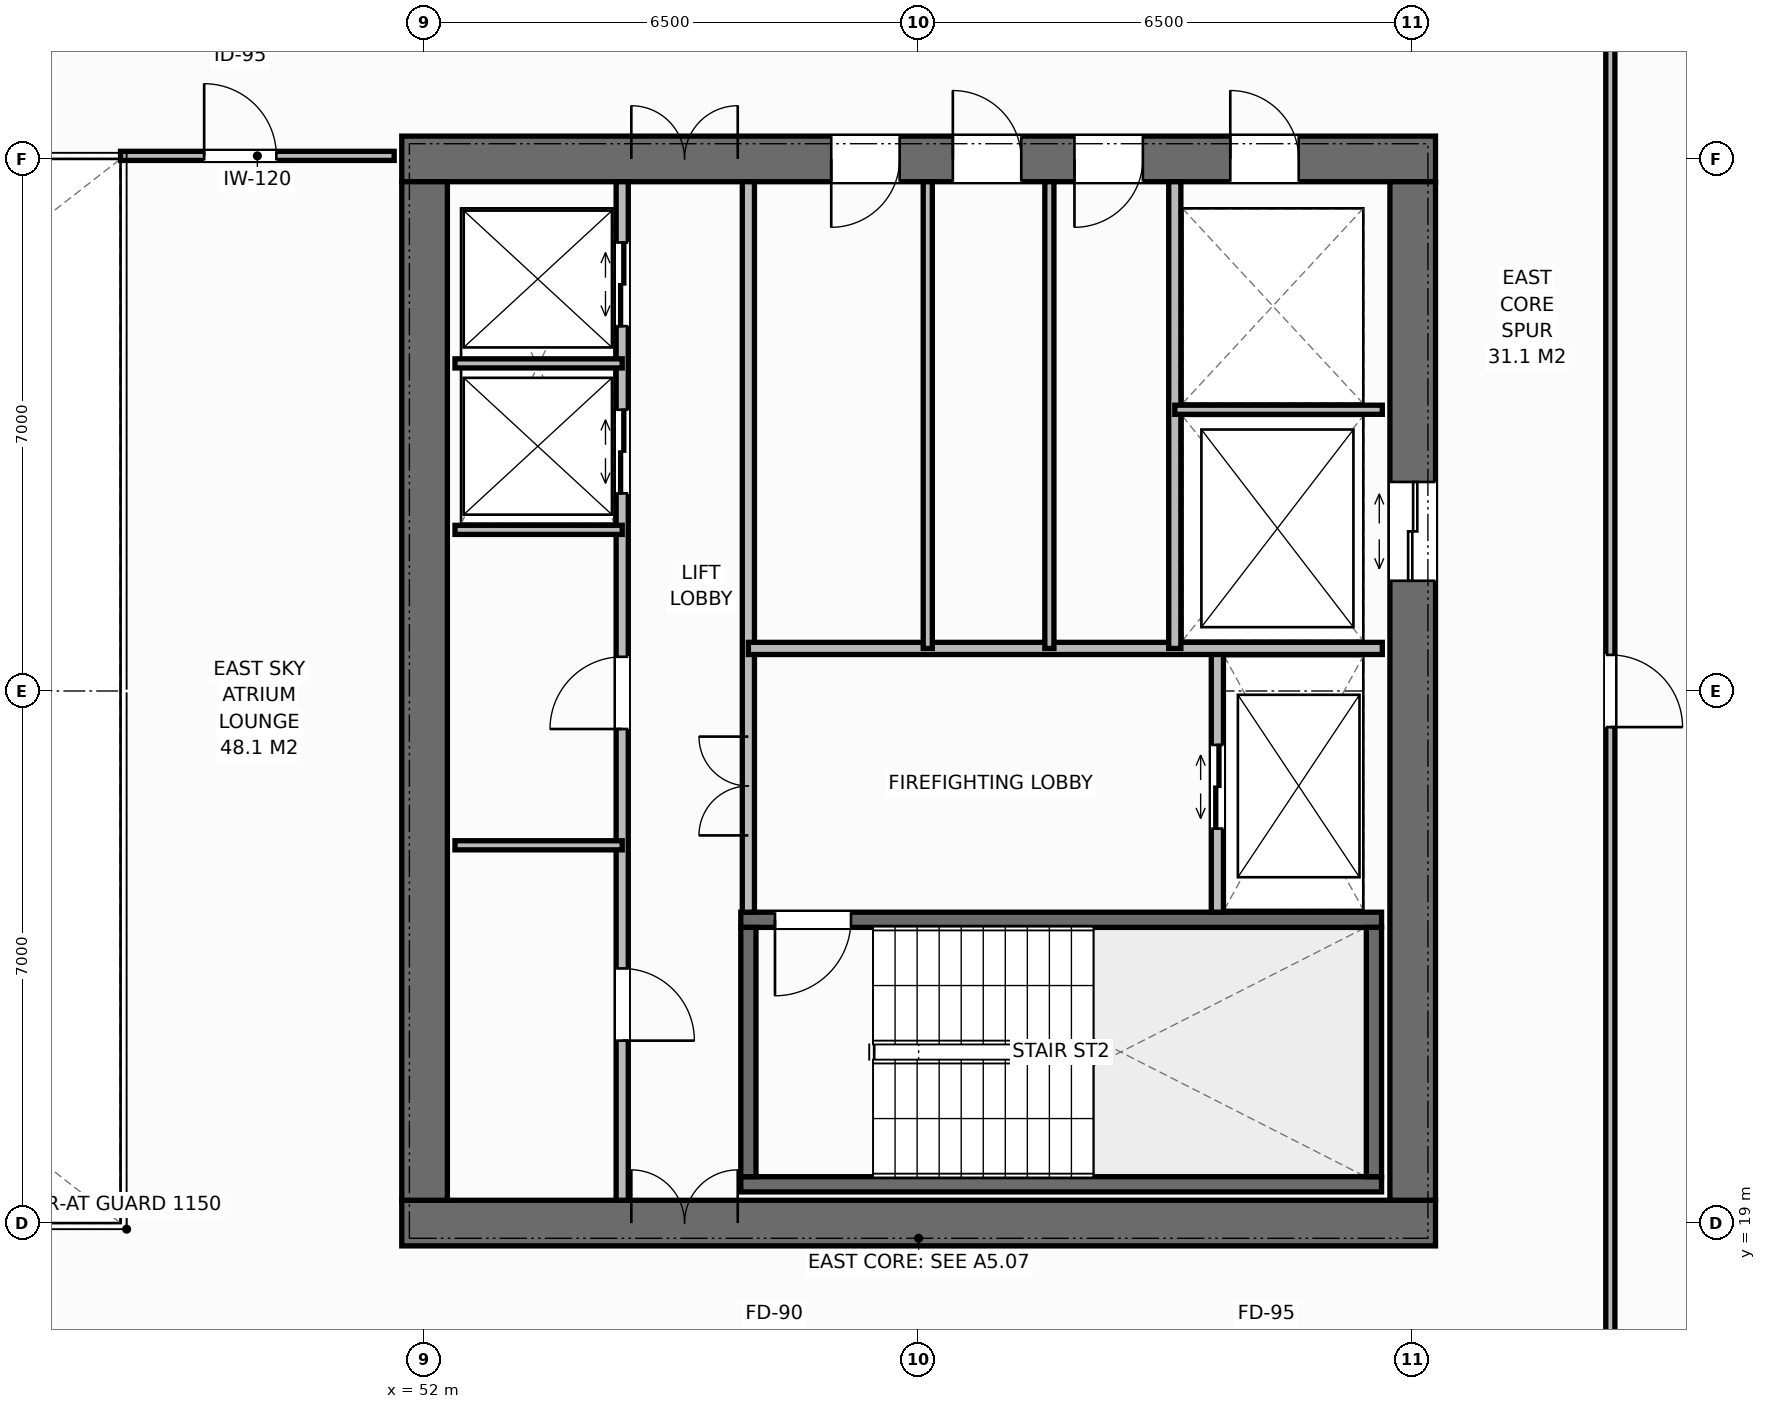
"""IFC4 building model, lengths in metres.
Left out: names, types, materials, properties, quantities, classifications, styles, units other than length and angle.
Written with IfcOpenShell. Run it as: python <this file> out.ifc"""

import sys

from ifc_helpers import new_model, si_unit, direction, frame, frame_2d, origin, place, context, subcontext, project, spatial, rectangle, extrude, element, fill, save


model = new_model("IFC4")
c1 = context("Model", 3, precision=1e-05, world=origin(), true_north=direction((0.0, 1.0)))
c2 = subcontext(c1, "Body", "Model", "MODEL_VIEW")
j1 = project(units=[si_unit("LENGTHUNIT", "METRE"), si_unit("PLANEANGLEUNIT", "RADIAN")], contexts=[c1])
p1 = place(None, origin())
s1 = spatial("IfcSite", under=j1, at=p1, CompositionType="ELEMENT")
p2 = place(p1, origin())
s2 = spatial("IfcBuilding", under=s1, at=p2, CompositionType="ELEMENT")
p3 = place(p2, frame((0.0, 0.0, 182.2)))
s3 = spatial("IfcBuildingStorey", under=s2, at=p3, CompositionType="ELEMENT", Elevation=182.2)
p4 = place(p3, frame((51.7, 19.0, 0.0), z_axis=(0.0, 0.0, 1.0), x_axis=(1.0, 0.0, 0.0)))
e1 = element("IfcWall", 1, at=p4, inside=s3, PredefinedType="SHEAR", context=c2, shape_type="SweptSolid", body=[
    extrude(rectangle(XDim=13.6, YDim=0.6, at=frame_2d((6.8, 0.0))), origin(), (0.0, 0.0, 1.0), 3.8),
])
p5 = place(p4, frame((3.02, 0.0, 0.0)))
e2 = element("IfcOpeningElement", 2, at=p5, cuts=e1, PredefinedType="OPENING", context=c2, shape_type="SweptSolid", body=[
    extrude(rectangle(XDim=1.4, YDim=2.2, at=frame_2d((0.7, 1.1))), frame((0.0, 0.31, 0.0), z_axis=(0.0, -1.0, 0.0), x_axis=(1.0, 0.0, 0.0)), (0.0, 0.0, 1.0), 0.62),
])
p6 = place(p3, frame((51.7, 33.0, 0.0), z_axis=(0.0, 0.0, 1.0), x_axis=(1.0, 0.0, 0.0)))
e3 = element("IfcWall", 3, at=p6, inside=s3, PredefinedType="SHEAR", context=c2, shape_type="SweptSolid", body=[
    extrude(rectangle(XDim=13.6, YDim=0.6, at=frame_2d((6.8, 0.0))), origin(), (0.0, 0.0, 1.0), 3.8),
])
p7 = place(p6, frame((3.02, 0.0, 0.0)))
e4 = element("IfcOpeningElement", 4, at=p7, cuts=e3, PredefinedType="OPENING", context=c2, shape_type="SweptSolid", body=[
    extrude(rectangle(XDim=1.4, YDim=2.2, at=frame_2d((0.7, 1.1))), frame((0.0, 0.31, 0.0), z_axis=(0.0, -1.0, 0.0), x_axis=(1.0, 0.0, 0.0)), (0.0, 0.0, 1.0), 0.62),
])
p8 = place(p6, frame((10.9, 0.0, 0.0)))
e5 = element("IfcOpeningElement", 5, at=p8, cuts=e3, PredefinedType="OPENING", context=c2, shape_type="SweptSolid", body=[
    extrude(rectangle(XDim=0.9, YDim=2.15, at=frame_2d((0.45, 1.075))), frame((0.0, 0.31, 0.0), z_axis=(0.0, -1.0, 0.0), x_axis=(1.0, 0.0, 0.0)), (0.0, 0.0, 1.0), 0.62),
])
p9 = place(p6, frame((5.65, 0.0, 0.0)))
e6 = element("IfcOpeningElement", 6, at=p9, cuts=e3, PredefinedType="OPENING", context=c2, shape_type="SweptSolid", body=[
    extrude(rectangle(XDim=0.9, YDim=2.15, at=frame_2d((0.45, 1.075))), frame((0.0, 0.31, 0.0), z_axis=(0.0, -1.0, 0.0), x_axis=(1.0, 0.0, 0.0)), (0.0, 0.0, 1.0), 0.62),
])
p10 = place(p6, frame((7.25, 0.0, 0.0)))
e7 = element("IfcOpeningElement", 7, at=p10, cuts=e3, PredefinedType="OPENING", context=c2, shape_type="SweptSolid", body=[
    extrude(rectangle(XDim=0.9, YDim=2.15, at=frame_2d((0.45, 1.075))), frame((0.0, 0.31, 0.0), z_axis=(0.0, -1.0, 0.0), x_axis=(1.0, 0.0, 0.0)), (0.0, 0.0, 1.0), 0.62),
])
p11 = place(p6, frame((8.85, 0.0, 0.0)))
e8 = element("IfcOpeningElement", 8, at=p11, cuts=e3, PredefinedType="OPENING", context=c2, shape_type="SweptSolid", body=[
    extrude(rectangle(XDim=0.9, YDim=2.15, at=frame_2d((0.45, 1.075))), frame((0.0, 0.31, 0.0), z_axis=(0.0, -1.0, 0.0), x_axis=(1.0, 0.0, 0.0)), (0.0, 0.0, 1.0), 0.62),
])
p12 = place(p3, frame((52.0, 19.3, 0.0), z_axis=(0.0, 0.0, 1.0), x_axis=(0.0, 1.0, 0.0)))
e9 = element("IfcWall", 9, at=p12, inside=s3, PredefinedType="SHEAR", context=c2, shape_type="SweptSolid", body=[
    extrude(rectangle(XDim=13.4, YDim=0.6, at=frame_2d((6.7, 0.0))), origin(), (0.0, 0.0, 1.0), 3.8),
])
p13 = place(p3, frame((65.0, 19.3, 0.0), z_axis=(0.0, 0.0, 1.0), x_axis=(0.0, 1.0, 0.0)))
e10 = element("IfcWall", 10, at=p13, inside=s3, PredefinedType="SHEAR", context=c2, shape_type="SweptSolid", body=[
    extrude(rectangle(XDim=13.4, YDim=0.6, at=frame_2d((6.7, 0.0))), origin(), (0.0, 0.0, 1.0), 3.8),
])
p14 = place(p13, frame((8.15, 0.0, 0.0)))
e11 = element("IfcOpeningElement", 11, at=p14, cuts=e10, PredefinedType="OPENING", context=c2, shape_type="SweptSolid", body=[
    extrude(rectangle(XDim=1.3, YDim=2.2, at=frame_2d((0.65, 1.1))), frame((0.0, 0.31, 0.0), z_axis=(0.0, -1.0, 0.0), x_axis=(1.0, 0.0, 0.0)), (0.0, 0.0, 1.0), 0.62),
])
p15 = place(p3, frame((56.16, 19.51, 0.0), z_axis=(0.0, 0.0, 1.0), x_axis=(1.0, 0.0, 0.0)))
e12 = element("IfcWall", 12, at=p15, inside=s3, PredefinedType="SHEAR", context=c2, shape_type="SweptSolid", body=[
    extrude(rectangle(XDim=8.43, YDim=0.2, at=frame_2d((4.215, 0.0))), origin(), (0.0, 0.0, 1.0), 3.8),
])
p16 = place(p3, frame((56.16, 22.99, 0.0), z_axis=(0.0, 0.0, 1.0), x_axis=(1.0, 0.0, 0.0)))
e13 = element("IfcWall", 13, at=p16, inside=s3, PredefinedType="SHEAR", context=c2, shape_type="SweptSolid", body=[
    extrude(rectangle(XDim=8.43, YDim=0.2, at=frame_2d((4.215, 0.0))), origin(), (0.0, 0.0, 1.0), 3.8),
])
p17 = place(p16, frame((0.45, 0.0, 0.0)))
e14 = element("IfcOpeningElement", 14, at=p17, cuts=e13, PredefinedType="OPENING", context=c2, shape_type="SweptSolid", body=[
    extrude(rectangle(XDim=1.0, YDim=2.15, at=frame_2d((0.5, 1.075))), frame((0.0, 0.11, 0.0), z_axis=(0.0, -1.0, 0.0), x_axis=(1.0, 0.0, 0.0)), (0.0, 0.0, 1.0), 0.22),
])
for number, where, z_axis, x_axis in (
    (15, (56.26, 19.61, 0.0), (0.0, 0.0, 1.0), (0.0, 1.0, 0.0)),
    (16, (64.49, 19.61, 0.0), (0.0, 0.0, 1.0), (0.0, 1.0, 0.0)),
):
    element("IfcWall", number, at=place(p3, frame(where, z_axis=z_axis, x_axis=x_axis)), inside=s3, PredefinedType="SHEAR", context=c2, shape_type="SweptSolid", body=[
        extrude(rectangle(XDim=3.28, YDim=0.2, at=frame_2d((1.64, 0.0))), origin(), (0.0, 0.0, 1.0), 3.8),
    ])
p18 = place(p3, frame((54.6, 19.3, 0.0), z_axis=(0.0, 0.0, 1.0), x_axis=(0.0, 1.0, 0.0)))
e17 = element("IfcWall", 17, at=p18, inside=s3, PredefinedType="STANDARD", context=c2, shape_type="SweptSolid", body=[
    extrude(rectangle(XDim=13.4, YDim=0.16, at=frame_2d((6.7, 0.0))), origin(), (0.0, 0.0, 1.0), 3.572),
])
p19 = place(p18, frame((2.1, 0.0, 0.0)))
e18 = element("IfcOpeningElement", 18, at=p19, cuts=e17, PredefinedType="OPENING", context=c2, shape_type="SweptSolid", body=[
    extrude(rectangle(XDim=0.95, YDim=2.15, at=frame_2d((0.475, 1.075))), frame((0.0, 0.09, 0.0), z_axis=(0.0, -1.0, 0.0), x_axis=(1.0, 0.0, 0.0)), (0.0, 0.0, 1.0), 0.18),
])
p20 = place(p18, frame((6.2, 0.0, 0.0)))
e19 = element("IfcOpeningElement", 19, at=p20, cuts=e17, PredefinedType="OPENING", context=c2, shape_type="SweptSolid", body=[
    extrude(rectangle(XDim=0.95, YDim=2.15, at=frame_2d((0.475, 1.075))), frame((0.0, 0.09, 0.0), z_axis=(0.0, -1.0, 0.0), x_axis=(1.0, 0.0, 0.0)), (0.0, 0.0, 1.0), 0.18),
])
p21 = place(p18, frame((9.3, 0.0, 0.0)))
e20 = element("IfcOpeningElement", 20, at=p21, cuts=e17, PredefinedType="OPENING", context=c2, shape_type="SweptSolid", body=[
    extrude(rectangle(XDim=1.1, YDim=2.2, at=frame_2d((0.55, 1.1))), frame((0.0, 0.09, 0.0), z_axis=(0.0, -1.0, 0.0), x_axis=(1.0, 0.0, 0.0)), (0.0, 0.0, 1.0), 0.18),
])
p22 = place(p18, frame((11.5, 0.0, 0.0)))
e21 = element("IfcOpeningElement", 21, at=p22, cuts=e17, PredefinedType="OPENING", context=c2, shape_type="SweptSolid", body=[
    extrude(rectangle(XDim=1.1, YDim=2.2, at=frame_2d((0.55, 1.1))), frame((0.0, 0.09, 0.0), z_axis=(0.0, -1.0, 0.0), x_axis=(1.0, 0.0, 0.0)), (0.0, 0.0, 1.0), 0.18),
])
p23 = place(p3, frame((56.26, 23.09, 0.0), z_axis=(0.0, 0.0, 1.0), x_axis=(0.0, 1.0, 0.0)))
e22 = element("IfcWall", 22, at=p23, inside=s3, PredefinedType="STANDARD", context=c2, shape_type="SweptSolid", body=[
    extrude(rectangle(XDim=9.61, YDim=0.16, at=frame_2d((4.805, 0.0))), origin(), (0.0, 0.0, 1.0), 3.572),
])
p24 = place(p23, frame((1.01, 0.0, 0.0)))
e23 = element("IfcOpeningElement", 23, at=p24, cuts=e22, PredefinedType="OPENING", context=c2, shape_type="SweptSolid", body=[
    extrude(rectangle(XDim=1.3, YDim=2.2, at=frame_2d((0.65, 1.1))), frame((0.0, 0.09, 0.0), z_axis=(0.0, -1.0, 0.0), x_axis=(1.0, 0.0, 0.0)), (0.0, 0.0, 1.0), 0.18),
])
for number, where, z_axis, x_axis in (
    (24, (52.4, 23.97, 0.0), (0.0, 0.0, 1.0), (1.0, 0.0, 0.0)),
    (25, (52.4, 28.12, 0.0), (0.0, 0.0, 1.0), (1.0, 0.0, 0.0)),
    (26, (52.4, 30.31, 0.0), (0.0, 0.0, 1.0), (1.0, 0.0, 0.0)),
):
    element("IfcWall", number, at=place(p3, frame(where, z_axis=z_axis, x_axis=x_axis)), inside=s3, PredefinedType="PARTITIONING", context=c2, shape_type="SweptSolid", body=[
        extrude(rectangle(XDim=2.2, YDim=0.12, at=frame_2d((1.1, 0.0))), origin(), (0.0, 0.0, 1.0), 3.572),
    ])
p25 = place(p3, frame((62.43, 23.09, 0.0), z_axis=(0.0, 0.0, 1.0), x_axis=(0.0, 1.0, 0.0)))
e27 = element("IfcWall", 27, at=p25, inside=s3, PredefinedType="STANDARD", context=c2, shape_type="SweptSolid", body=[
    extrude(rectangle(XDim=3.47, YDim=0.16, at=frame_2d((1.735, 0.0))), origin(), (0.0, 0.0, 1.0), 3.572),
])
p26 = place(p25, frame((1.1, 0.0, 0.0)))
e28 = element("IfcOpeningElement", 28, at=p26, cuts=e27, PredefinedType="OPENING", context=c2, shape_type="SweptSolid", body=[
    extrude(rectangle(XDim=1.1, YDim=2.2, at=frame_2d((0.55, 1.1))), frame((0.0, 0.09, 0.0), z_axis=(0.0, -1.0, 0.0), x_axis=(1.0, 0.0, 0.0)), (0.0, 0.0, 1.0), 0.18),
])
p27 = place(p3, frame((56.26, 26.56, 0.0), z_axis=(0.0, 0.0, 1.0), x_axis=(1.0, 0.0, 0.0)))
e29 = element("IfcWall", 29, at=p27, inside=s3, PredefinedType="STANDARD", context=c2, shape_type="SweptSolid", body=[
    extrude(rectangle(XDim=8.34, YDim=0.16, at=frame_2d((4.17, 0.0))), origin(), (0.0, 0.0, 1.0), 3.572),
])
p28 = place(p3, frame((61.87, 26.56, 0.0), z_axis=(0.0, 0.0, 1.0), x_axis=(0.0, 1.0, 0.0)))
e30 = element("IfcWall", 30, at=p28, inside=s3, PredefinedType="STANDARD", context=c2, shape_type="SweptSolid", body=[
    extrude(rectangle(XDim=6.14, YDim=0.16, at=frame_2d((3.07, 0.0))), origin(), (0.0, 0.0, 1.0), 3.572),
])
p29 = place(p3, frame((61.87, 29.7, 0.0), z_axis=(0.0, 0.0, 1.0), x_axis=(1.0, 0.0, 0.0)))
e31 = element("IfcWall", 31, at=p29, inside=s3, PredefinedType="PARTITIONING", context=c2, shape_type="SweptSolid", body=[
    extrude(rectangle(XDim=2.73, YDim=0.12, at=frame_2d((1.365, 0.0))), origin(), (0.0, 0.0, 1.0), 3.572),
])
for number, where, z_axis, x_axis in (
    (32, (58.62, 26.56, 0.0), (0.0, 0.0, 1.0), (0.0, 1.0, 0.0)),
    (33, (60.22, 26.56, 0.0), (0.0, 0.0, 1.0), (0.0, 1.0, 0.0)),
):
    element("IfcWall", number, at=place(p3, frame(where, z_axis=z_axis, x_axis=x_axis)), inside=s3, PredefinedType="PARTITIONING", context=c2, shape_type="SweptSolid", body=[
        extrude(rectangle(XDim=6.14, YDim=0.12, at=frame_2d((3.07, 0.0))), origin(), (0.0, 0.0, 1.0), 3.572),
    ])
p30 = place(p3, frame((48.0, 33.04, 0.0), z_axis=(0.0, 0.0, 1.0), x_axis=(1.0, 0.0, 0.0)))
e34 = element("IfcWall", 34, at=p30, inside=s3, PredefinedType="PARTITIONING", context=c2, shape_type="SweptSolid", body=[
    extrude(rectangle(XDim=3.6, YDim=0.12, at=frame_2d((1.8, 0.0))), origin(), (0.0, 0.0, 1.0), 3.312),
])
p31 = place(p30, frame((1.1, 0.0, 0.0)))
e35 = element("IfcOpeningElement", 35, at=p31, cuts=e34, PredefinedType="OPENING", context=c2, shape_type="SweptSolid", body=[
    extrude(rectangle(XDim=0.95, YDim=2.15, at=frame_2d((0.475, 1.075))), frame((0.0, 0.07, 0.0), z_axis=(0.0, -1.0, 0.0), x_axis=(1.0, 0.0, 0.0)), (0.0, 0.0, 1.0), 0.14),
])
p32 = place(p3, frame((67.6, 16.5, 0.0), z_axis=(0.0, 0.0, 1.0), x_axis=(0.0, 1.0, 0.0)))
e36 = element("IfcWall", 36, at=p32, inside=s3, PredefinedType="PARTITIONING", context=c2, shape_type="SweptSolid", body=[
    extrude(rectangle(XDim=19.0, YDim=0.12, at=frame_2d((9.5, 0.0))), origin(), (0.0, 0.0, 1.0), 3.572),
])
p33 = place(p32, frame((9.025, 0.0, 0.0)))
e37 = element("IfcOpeningElement", 37, at=p33, cuts=e36, PredefinedType="OPENING", context=c2, shape_type="SweptSolid", body=[
    extrude(rectangle(XDim=0.95, YDim=2.15, at=frame_2d((0.475, 1.075))), frame((0.0, 0.07, 0.0), z_axis=(0.0, -1.0, 0.0), x_axis=(1.0, 0.0, 0.0)), (0.0, 0.0, 1.0), 0.14),
])
p34 = place(p5, origin())
e38 = element("IfcDoor", 38, at=p34, inside=s3, OperationType="DOUBLE_DOOR_SINGLE_SWING", PredefinedType="DOOR", context=c2, shape_type="SweptSolid", body=[
    extrude(rectangle(XDim=1.4, YDim=2.2, at=frame_2d((0.7, 1.1))), frame((0.0, 0.075, 0.0), z_axis=(0.0, -1.0, 0.0), x_axis=(1.0, 0.0, 0.0)), (0.0, 0.0, 1.0), 0.05),
])
fill(e2, e38)
p35 = place(p7, origin())
e39 = element("IfcDoor", 39, at=p35, inside=s3, OperationType="DOUBLE_DOOR_SINGLE_SWING", PredefinedType="DOOR", context=c2, shape_type="SweptSolid", body=[
    extrude(rectangle(XDim=1.4, YDim=2.2, at=frame_2d((0.7, 1.1))), frame((0.0, -0.025, 0.0), z_axis=(0.0, -1.0, 0.0), x_axis=(1.0, 0.0, 0.0)), (0.0, 0.0, 1.0), 0.05),
])
fill(e4, e39)
p36 = place(p19, origin())
e40 = element("IfcDoor", 40, at=p36, inside=s3, OperationType="SINGLE_SWING_RIGHT", PredefinedType="DOOR", context=c2, shape_type="SweptSolid", body=[
    extrude(rectangle(XDim=0.95, YDim=2.15, at=frame_2d((0.475, 1.075))), frame((0.0, 0.025, 0.0), z_axis=(0.0, -1.0, 0.0), x_axis=(1.0, 0.0, 0.0)), (0.0, 0.0, 1.0), 0.05),
])
fill(e18, e40)
p37 = place(p20, origin())
e41 = element("IfcDoor", 41, at=p37, inside=s3, OperationType="SINGLE_SWING_LEFT", PredefinedType="DOOR", context=c2, shape_type="SweptSolid", body=[
    extrude(rectangle(XDim=0.95, YDim=2.15, at=frame_2d((0.475, 1.075))), frame((0.0, 0.025, 0.0), z_axis=(0.0, -1.0, 0.0), x_axis=(1.0, 0.0, 0.0)), (0.0, 0.0, 1.0), 0.05),
])
fill(e19, e41)
p38 = place(p21, origin())
e42 = element("IfcDoor", 42, at=p38, inside=s3, OperationType="DOUBLE_DOOR_SLIDING", PredefinedType="DOOR", context=c2, shape_type="SweptSolid", body=[
    extrude(rectangle(XDim=1.1, YDim=2.2, at=frame_2d((0.55, 1.1))), frame((0.0, 0.025, 0.0), z_axis=(0.0, -1.0, 0.0), x_axis=(1.0, 0.0, 0.0)), (0.0, 0.0, 1.0), 0.05),
])
fill(e20, e42)
p39 = place(p22, origin())
e43 = element("IfcDoor", 43, at=p39, inside=s3, OperationType="DOUBLE_DOOR_SLIDING", PredefinedType="DOOR", context=c2, shape_type="SweptSolid", body=[
    extrude(rectangle(XDim=1.1, YDim=2.2, at=frame_2d((0.55, 1.1))), frame((0.0, 0.025, 0.0), z_axis=(0.0, -1.0, 0.0), x_axis=(1.0, 0.0, 0.0)), (0.0, 0.0, 1.0), 0.05),
])
fill(e21, e43)
p40 = place(p17, origin())
e44 = element("IfcDoor", 44, at=p40, inside=s3, OperationType="SINGLE_SWING_RIGHT", PredefinedType="DOOR", context=c2, shape_type="SweptSolid", body=[
    extrude(rectangle(XDim=1.0, YDim=2.15, at=frame_2d((0.5, 1.075))), frame((0.0, 0.025, 0.0), z_axis=(0.0, -1.0, 0.0), x_axis=(1.0, 0.0, 0.0)), (0.0, 0.0, 1.0), 0.05),
])
fill(e14, e44)
p41 = place(p26, origin())
e45 = element("IfcDoor", 45, at=p41, inside=s3, OperationType="DOUBLE_DOOR_SLIDING", PredefinedType="DOOR", context=c2, shape_type="SweptSolid", body=[
    extrude(rectangle(XDim=1.1, YDim=2.2, at=frame_2d((0.55, 1.1))), frame((0.0, 0.025, 0.0), z_axis=(0.0, -1.0, 0.0), x_axis=(1.0, 0.0, 0.0)), (0.0, 0.0, 1.0), 0.05),
])
fill(e28, e45)
p42 = place(p24, origin())
e46 = element("IfcDoor", 46, at=p42, inside=s3, OperationType="DOUBLE_DOOR_SINGLE_SWING", PredefinedType="DOOR", context=c2, shape_type="SweptSolid", body=[
    extrude(rectangle(XDim=1.3, YDim=2.2, at=frame_2d((0.65, 1.1))), frame((0.0, 0.025, 0.0), z_axis=(0.0, -1.0, 0.0), x_axis=(1.0, 0.0, 0.0)), (0.0, 0.0, 1.0), 0.05),
])
fill(e23, e46)
p43 = place(p14, origin())
e47 = element("IfcDoor", 47, at=p43, inside=s3, OperationType="DOUBLE_DOOR_SLIDING", PredefinedType="DOOR", context=c2, shape_type="SweptSolid", body=[
    extrude(rectangle(XDim=1.3, YDim=2.2, at=frame_2d((0.65, 1.1))), frame((0.0, 0.025, 0.0), z_axis=(0.0, -1.0, 0.0), x_axis=(1.0, 0.0, 0.0)), (0.0, 0.0, 1.0), 0.05),
])
fill(e11, e47)
p44 = place(p8, origin())
e48 = element("IfcDoor", 48, at=p44, inside=s3, OperationType="SINGLE_SWING_LEFT", PredefinedType="DOOR", context=c2, shape_type="SweptSolid", body=[
    extrude(rectangle(XDim=0.9, YDim=2.15, at=frame_2d((0.45, 1.075))), frame((0.0, -0.025, 0.0), z_axis=(0.0, -1.0, 0.0), x_axis=(1.0, 0.0, 0.0)), (0.0, 0.0, 1.0), 0.05),
])
fill(e5, e48)
p45 = place(p9, origin())
e49 = element("IfcDoor", 49, at=p45, inside=s3, OperationType="SINGLE_SWING_RIGHT", PredefinedType="DOOR", context=c2, shape_type="SweptSolid", body=[
    extrude(rectangle(XDim=0.9, YDim=2.15, at=frame_2d((0.45, 1.075))), frame((0.0, -0.025, 0.0), z_axis=(0.0, -1.0, 0.0), x_axis=(1.0, 0.0, 0.0)), (0.0, 0.0, 1.0), 0.05),
])
fill(e6, e49)
p46 = place(p10, origin())
e50 = element("IfcDoor", 50, at=p46, inside=s3, OperationType="SINGLE_SWING_LEFT", PredefinedType="DOOR", context=c2, shape_type="SweptSolid", body=[
    extrude(rectangle(XDim=0.9, YDim=2.15, at=frame_2d((0.45, 1.075))), frame((0.0, -0.025, 0.0), z_axis=(0.0, -1.0, 0.0), x_axis=(1.0, 0.0, 0.0)), (0.0, 0.0, 1.0), 0.05),
])
fill(e7, e50)
p47 = place(p11, origin())
e51 = element("IfcDoor", 51, at=p47, inside=s3, OperationType="SINGLE_SWING_RIGHT", PredefinedType="DOOR", context=c2, shape_type="SweptSolid", body=[
    extrude(rectangle(XDim=0.9, YDim=2.15, at=frame_2d((0.45, 1.075))), frame((0.0, -0.025, 0.0), z_axis=(0.0, -1.0, 0.0), x_axis=(1.0, 0.0, 0.0)), (0.0, 0.0, 1.0), 0.05),
])
fill(e8, e51)
p48 = place(p31, origin())
e52 = element("IfcDoor", 52, at=p48, inside=s3, OperationType="SINGLE_SWING_LEFT", PredefinedType="DOOR", context=c2, shape_type="SweptSolid", body=[
    extrude(rectangle(XDim=0.95, YDim=2.15, at=frame_2d((0.475, 1.075))), frame((0.0, 0.025, 0.0), z_axis=(0.0, -1.0, 0.0), x_axis=(1.0, 0.0, 0.0)), (0.0, 0.0, 1.0), 0.05),
])
fill(e35, e52)
p49 = place(p33, origin())
e53 = element("IfcDoor", 53, at=p49, inside=s3, OperationType="SINGLE_SWING_RIGHT", PredefinedType="DOOR", context=c2, shape_type="SweptSolid", body=[
    extrude(rectangle(XDim=0.95, YDim=2.15, at=frame_2d((0.475, 1.075))), frame((0.0, 0.025, 0.0), z_axis=(0.0, -1.0, 0.0), x_axis=(1.0, 0.0, 0.0)), (0.0, 0.0, 1.0), 0.05),
])
fill(e37, e53)
save(model, sys.argv[1])
